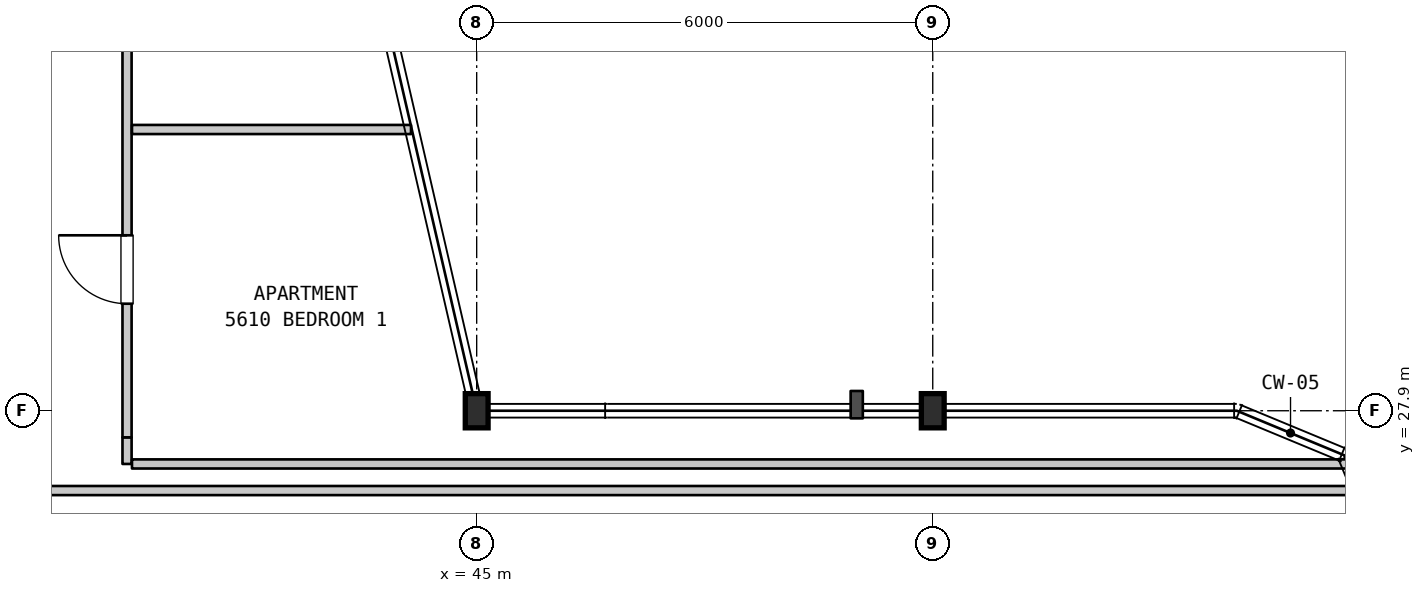
"""IFC4 building model, lengths in metres.
Left out: names, types, materials, properties, quantities, classifications, styles, units other than length and angle.
Written with IfcOpenShell. Run it as: python <this file> out.ifc"""

import sys

from ifc_helpers import new_model, si_unit, direction, frame, frame_2d, origin, origin_2d, place, context, subcontext, project, spatial, rectangle, i_section, extrude, element, fill, save


model = new_model("IFC4")
c1 = context("Model", 3, precision=1e-05, world=origin(), true_north=direction((0.0, 1.0)))
c2 = subcontext(c1, "Body", "Model", "MODEL_VIEW")
j1 = project(units=[si_unit("LENGTHUNIT", "METRE"), si_unit("PLANEANGLEUNIT", "RADIAN")], contexts=[c1])
p1 = place(None, origin())
s1 = spatial("IfcSite", under=j1, at=p1, CompositionType="ELEMENT")
p2 = place(p1, origin())
s2 = spatial("IfcBuilding", under=s1, at=p2, CompositionType="ELEMENT")
p3 = place(p2, frame((0.0, 0.0, 226.5)))
s3 = spatial("IfcBuildingStorey", under=s2, at=p3, CompositionType="ELEMENT", Elevation=226.5)
for number, where, z_axis, x_axis in (
    (1, (45.0, 27.9, 0.0), (0.0, 0.0, 1.0), (1.0, 0.0, 0.0)),
    (2, (51.0, 27.9, 0.0), (0.0, 0.0, 1.0), (1.0, 0.0, 0.0)),
):
    element("IfcColumn", number, at=place(p3, frame(where, z_axis=z_axis, x_axis=x_axis)), inside=s3, PredefinedType="COLUMN", context=c2, shape_type="SweptSolid", body=[
        extrude(i_section(OverallWidth=0.3, OverallDepth=0.45, WebThickness=0.014, FlangeThickness=0.026, FilletRadius=0.027, at=origin_2d()), origin(), (0.0, 0.0, 1.0), 3.7),
    ])
p4 = place(p3, frame((40.4, 27.2, 0.0), z_axis=(0.0, 0.0, 1.0), x_axis=(0.0, 1.0, 0.0)))
e3 = element("IfcWall", 3, at=p4, inside=s3, PredefinedType="PARTITIONING", context=c2, shape_type="SweptSolid", body=[
    extrude(rectangle(XDim=0.35, YDim=0.12, at=frame_2d((0.175, 0.0))), origin(), (0.0, 0.0, 1.0), 3.39),
])
p5 = place(p3, frame((40.4, 27.55, 0.0), z_axis=(0.0, 0.0, 1.0), x_axis=(0.0, 1.0, 0.0)))
e4 = element("IfcWall", 4, at=p5, inside=s3, PredefinedType="PARTITIONING", context=c2, shape_type="SweptSolid", body=[
    extrude(rectangle(XDim=12.2, YDim=0.12, at=frame_2d((6.1, 0.0))), origin(), (0.0, 0.0, 1.0), 3.39),
])
p6 = place(p5, frame((1.758, 0.0, 0.0)))
e5 = element("IfcOpeningElement", 5, at=p6, cuts=e4, PredefinedType="OPENING", context=c2, shape_type="SweptSolid", body=[
    extrude(rectangle(XDim=0.9, YDim=2.15, at=frame_2d((0.45, 1.075))), frame((0.0, 0.07, 0.0), z_axis=(0.0, -1.0, 0.0), x_axis=(1.0, 0.0, 0.0)), (0.0, 0.0, 1.0), 0.14),
])
p7 = place(p5, frame((5.579, 0.0, 0.0)))
e6 = element("IfcOpeningElement", 6, at=p7, cuts=e4, PredefinedType="OPENING", context=c2, shape_type="SweptSolid", body=[
    extrude(rectangle(XDim=0.9, YDim=2.15, at=frame_2d((0.45, 1.075))), frame((0.0, 0.07, 0.0), z_axis=(0.0, -1.0, 0.0), x_axis=(1.0, 0.0, 0.0)), (0.0, 0.0, 1.0), 0.14),
])
p8 = place(p5, frame((9.541, 0.0, 0.0)))
e7 = element("IfcOpeningElement", 7, at=p8, cuts=e4, PredefinedType="OPENING", context=c2, shape_type="SweptSolid", body=[
    extrude(rectangle(XDim=0.9, YDim=2.15, at=frame_2d((0.45, 1.075))), frame((0.0, 0.07, 0.0), z_axis=(0.0, -1.0, 0.0), x_axis=(1.0, 0.0, 0.0)), (0.0, 0.0, 1.0), 0.14),
])
p9 = place(p3, frame((36.645, 26.85, 0.0), z_axis=(0.0, 0.0, 1.0), x_axis=(1.0, 0.0, 0.0)))
e8 = element("IfcWall", 8, at=p9, inside=s3, PredefinedType="PARTITIONING", context=c2, shape_type="SweptSolid", body=[
    extrude(rectangle(XDim=19.951, YDim=0.12, at=frame_2d((9.976, 0.0))), origin(), (0.0, 0.0, 1.0), 3.39),
])
p10 = place(p3, frame((40.465, 27.2, 0.0), z_axis=(0.0, 0.0, 1.0), x_axis=(1.0, 0.0, 0.0)))
e9 = element("IfcWall", 9, at=p10, inside=s3, PredefinedType="PARTITIONING", context=c2, shape_type="SweptSolid", body=[
    extrude(rectangle(XDim=15.986, YDim=0.12, at=frame_2d((7.993, 0.0))), origin(), (0.0, 0.0, 1.0), 3.39),
])
p11 = place(p3, frame((40.465, 31.6, 0.0), z_axis=(0.0, 0.0, 1.0), x_axis=(1.0, 0.0, 0.0)))
e10 = element("IfcWall", 10, at=p11, inside=s3, PredefinedType="PARTITIONING", context=c2, shape_type="SweptSolid", body=[
    extrude(rectangle(XDim=3.671, YDim=0.12, at=frame_2d((1.835, 0.0))), origin(), (0.0, 0.0, 1.0), 3.39),
])
p12 = place(p6, origin())
e11 = element("IfcDoor", 11, at=p12, inside=s3, OperationType="SINGLE_SWING_RIGHT", PredefinedType="DOOR", context=c2, shape_type="SweptSolid", body=[
    extrude(rectangle(XDim=0.9, YDim=2.15, at=frame_2d((0.45, 1.075))), frame((0.0, 0.025, 0.0), z_axis=(0.0, -1.0, 0.0), x_axis=(1.0, 0.0, 0.0)), (0.0, 0.0, 1.0), 0.05),
])
fill(e5, e11)
save(model, sys.argv[1])
